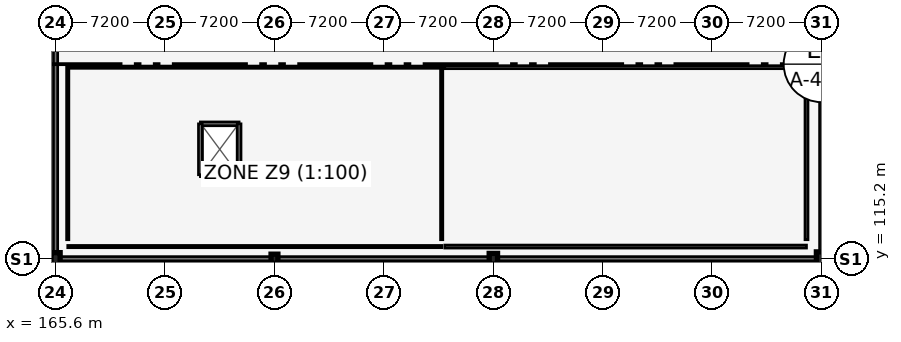
"""IFC4 building model, lengths in metres.
Left out: names, types, materials, properties, quantities, classifications, styles, units other than length and angle.
Written with IfcOpenShell. Run it as: python <this file> out.ifc"""

import sys

from ifc_helpers import new_model, si_unit, direction, frame, frame_2d, origin, origin_2d, place, context, subcontext, project, spatial, rectangle, extrude, element, fill, save


model = new_model("IFC4")
c1 = context("Model", 3, precision=1e-05, world=origin(), true_north=direction((0.0, 1.0)))
c2 = subcontext(c1, "Body", "Model", "MODEL_VIEW")
j1 = project(units=[si_unit("LENGTHUNIT", "METRE"), si_unit("PLANEANGLEUNIT", "RADIAN")], contexts=[c1])
p1 = place(None, origin())
s1 = spatial("IfcSite", under=j1, at=p1, CompositionType="ELEMENT")
p2 = place(p1, origin())
s2 = spatial("IfcBuilding", under=s1, at=p2, CompositionType="ELEMENT")
p3 = place(p2, frame((0.0, 0.0, 4.8)))
s3 = spatial("IfcBuildingStorey", under=s2, at=p3, CompositionType="ELEMENT", Elevation=4.8)
p4 = place(p3, frame((165.6, 115.2, 0.0), z_axis=(0.0, 0.0, 1.0), x_axis=(1.0, 0.0, 0.0)))
e1 = element("IfcColumn", 1, at=p4, inside=s3, PredefinedType="COLUMN", context=c2, shape_type="SweptSolid", body=[
    extrude(rectangle(XDim=0.6, YDim=0.8, at=origin_2d()), origin(), (0.0, 0.0, 1.0), 4.2),
])
p5 = place(p3, frame((180.0, 115.2, 0.0), z_axis=(0.0, 0.0, 1.0), x_axis=(1.0, 0.0, 0.0)))
e2 = element("IfcColumn", 2, at=p5, inside=s3, PredefinedType="COLUMN", context=c2, shape_type="SweptSolid", body=[
    extrude(rectangle(XDim=0.45, YDim=0.6, at=origin_2d()), origin(), (0.0, 0.0, 1.0), 4.2),
])
p6 = place(p3, frame((194.4, 115.2, 0.0), z_axis=(0.0, 0.0, 1.0), x_axis=(1.0, 0.0, 0.0)))
e3 = element("IfcColumn", 3, at=p6, inside=s3, PredefinedType="COLUMN", context=c2, shape_type="SweptSolid", body=[
    extrude(rectangle(XDim=0.55, YDim=0.7, at=origin_2d()), origin(), (0.0, 0.0, 1.0), 4.2),
])
p7 = place(p3, frame((216.0, 115.2, 0.0), z_axis=(0.0, 0.0, 1.0), x_axis=(1.0, 0.0, 0.0)))
e4 = element("IfcColumn", 4, at=p7, inside=s3, PredefinedType="COLUMN", context=c2, shape_type="SweptSolid", body=[
    extrude(rectangle(XDim=0.7, YDim=0.9, at=origin_2d()), origin(), (0.0, 0.0, 1.0), 4.2),
])
p8 = place(p3, frame((165.6, 115.2, 0.0), z_axis=(0.0, 0.0, 1.0), x_axis=(1.0, 0.0, 0.0)))
e5 = element("IfcWall", 5, at=p8, inside=s3, PredefinedType="SOLIDWALL", context=c2, shape_type="SweptSolid", body=[
    extrude(rectangle(XDim=50.4, YDim=0.28, at=frame_2d((25.2, 0.0))), origin(), (0.0, 0.0, 1.0), 3.5),
])
p9 = place(p8, frame((2.2, 0.0, 0.78)))
e6 = element("IfcOpeningElement", 6, at=p9, cuts=e5, PredefinedType="OPENING", context=c2, shape_type="SweptSolid", body=[
    extrude(rectangle(XDim=1.25, YDim=1.7, at=frame_2d((0.625, 0.85))), frame((0.0, 0.15, 0.0), z_axis=(0.0, -1.0, 0.0), x_axis=(1.0, 0.0, 0.0)), (0.0, 0.0, 1.0), 0.3),
])
p10 = place(p8, frame((9.4, 0.0, 0.78)))
e7 = element("IfcOpeningElement", 7, at=p10, cuts=e5, PredefinedType="OPENING", context=c2, shape_type="SweptSolid", body=[
    extrude(rectangle(XDim=1.35, YDim=1.75, at=frame_2d((0.675, 0.875))), frame((0.0, 0.15, 0.0), z_axis=(0.0, -1.0, 0.0), x_axis=(1.0, 0.0, 0.0)), (0.0, 0.0, 1.0), 0.3),
])
p11 = place(p8, frame((16.6, 0.0, 0.78)))
e8 = element("IfcOpeningElement", 8, at=p11, cuts=e5, PredefinedType="OPENING", context=c2, shape_type="SweptSolid", body=[
    extrude(rectangle(XDim=1.5, YDim=1.75, at=frame_2d((0.75, 0.875))), frame((0.0, 0.15, 0.0), z_axis=(0.0, -1.0, 0.0), x_axis=(1.0, 0.0, 0.0)), (0.0, 0.0, 1.0), 0.3),
])
p12 = place(p8, frame((23.8, 0.0, 0.78)))
e9 = element("IfcOpeningElement", 9, at=p12, cuts=e5, PredefinedType="OPENING", context=c2, shape_type="SweptSolid", body=[
    extrude(rectangle(XDim=1.65, YDim=1.8, at=frame_2d((0.825, 0.9))), frame((0.0, 0.15, 0.0), z_axis=(0.0, -1.0, 0.0), x_axis=(1.0, 0.0, 0.0)), (0.0, 0.0, 1.0), 0.3),
])
p13 = place(p8, frame((31.0, 0.0, 0.78)))
e10 = element("IfcOpeningElement", 10, at=p13, cuts=e5, PredefinedType="OPENING", context=c2, shape_type="SweptSolid", body=[
    extrude(rectangle(XDim=1.95, YDim=1.8, at=frame_2d((0.975, 0.9))), frame((0.0, 0.15, 0.0), z_axis=(0.0, -1.0, 0.0), x_axis=(1.0, 0.0, 0.0)), (0.0, 0.0, 1.0), 0.3),
])
p14 = place(p8, frame((38.2, 0.0, 0.78)))
e11 = element("IfcOpeningElement", 11, at=p14, cuts=e5, PredefinedType="OPENING", context=c2, shape_type="SweptSolid", body=[
    extrude(rectangle(XDim=2.1, YDim=1.8, at=frame_2d((1.05, 0.9))), frame((0.0, 0.15, 0.0), z_axis=(0.0, -1.0, 0.0), x_axis=(1.0, 0.0, 0.0)), (0.0, 0.0, 1.0), 0.3),
])
p15 = place(p3, frame((165.6, 144.0, 0.0), z_axis=(0.0, 0.0, 1.0), x_axis=(0.0, -1.0, 0.0)))
e12 = element("IfcWall", 12, at=p15, inside=s3, PredefinedType="SOLIDWALL", context=c2, shape_type="SweptSolid", body=[
    extrude(rectangle(XDim=28.8, YDim=0.28, at=frame_2d((14.4, 0.0))), origin(), (0.0, 0.0, 1.0), 3.5),
])
p16 = place(p15, frame((2.2, 0.0, 0.78)))
e13 = element("IfcOpeningElement", 13, at=p16, cuts=e12, PredefinedType="OPENING", context=c2, shape_type="SweptSolid", body=[
    extrude(rectangle(XDim=1.5, YDim=1.75, at=frame_2d((0.75, 0.875))), frame((0.0, 0.15, 0.0), z_axis=(0.0, -1.0, 0.0), x_axis=(1.0, 0.0, 0.0)), (0.0, 0.0, 1.0), 0.3),
])
p17 = place(p15, frame((9.4, 0.0, 0.78)))
e14 = element("IfcOpeningElement", 14, at=p17, cuts=e12, PredefinedType="OPENING", context=c2, shape_type="SweptSolid", body=[
    extrude(rectangle(XDim=1.65, YDim=1.8, at=frame_2d((0.825, 0.9))), frame((0.0, 0.15, 0.0), z_axis=(0.0, -1.0, 0.0), x_axis=(1.0, 0.0, 0.0)), (0.0, 0.0, 1.0), 0.3),
])
p18 = place(p15, frame((16.6, 0.0, 0.78)))
e15 = element("IfcOpeningElement", 15, at=p18, cuts=e12, PredefinedType="OPENING", context=c2, shape_type="SweptSolid", body=[
    extrude(rectangle(XDim=1.95, YDim=1.8, at=frame_2d((0.975, 0.9))), frame((0.0, 0.15, 0.0), z_axis=(0.0, -1.0, 0.0), x_axis=(1.0, 0.0, 0.0)), (0.0, 0.0, 1.0), 0.3),
])
p19 = place(p3, frame((216.0, 115.2, 0.0), z_axis=(0.0, 0.0, 1.0), x_axis=(0.0, 1.0, 0.0)))
e16 = element("IfcWall", 16, at=p19, inside=s3, PredefinedType="SOLIDWALL", context=c2, shape_type="SweptSolid", body=[
    extrude(rectangle(XDim=28.8, YDim=0.28, at=frame_2d((14.4, 0.0))), origin(), (0.0, 0.0, 1.0), 3.482),
])
p20 = place(p19, frame((2.2, 0.0, 0.78)))
e17 = element("IfcOpeningElement", 17, at=p20, cuts=e16, PredefinedType="OPENING", context=c2, shape_type="SweptSolid", body=[
    extrude(rectangle(XDim=1.65, YDim=1.8, at=frame_2d((0.825, 0.9))), frame((0.0, 0.15, 0.0), z_axis=(0.0, -1.0, 0.0), x_axis=(1.0, 0.0, 0.0)), (0.0, 0.0, 1.0), 0.3),
])
p21 = place(p19, frame((9.4, 0.0, 0.78)))
e18 = element("IfcOpeningElement", 18, at=p21, cuts=e16, PredefinedType="OPENING", context=c2, shape_type="SweptSolid", body=[
    extrude(rectangle(XDim=1.95, YDim=1.8, at=frame_2d((0.975, 0.9))), frame((0.0, 0.15, 0.0), z_axis=(0.0, -1.0, 0.0), x_axis=(1.0, 0.0, 0.0)), (0.0, 0.0, 1.0), 0.3),
])
p22 = place(p19, frame((16.6, 0.0, 0.78)))
e19 = element("IfcOpeningElement", 19, at=p22, cuts=e16, PredefinedType="OPENING", context=c2, shape_type="SweptSolid", body=[
    extrude(rectangle(XDim=2.1, YDim=1.8, at=frame_2d((1.05, 0.9))), frame((0.0, 0.15, 0.0), z_axis=(0.0, -1.0, 0.0), x_axis=(1.0, 0.0, 0.0)), (0.0, 0.0, 1.0), 0.3),
])
p23 = place(p3, frame((175.125, 120.725, 0.0), z_axis=(0.0, 0.0, 1.0), x_axis=(1.0, 0.0, 0.0)))
e20 = element("IfcWall", 20, at=p23, inside=s3, PredefinedType="SHEAR", context=c2, shape_type="SweptSolid", body=[
    extrude(rectangle(XDim=2.55, YDim=0.25, at=frame_2d((1.275, 0.0))), origin(), (0.0, 0.0, 1.0), 3.55),
])
p24 = place(p3, frame((177.675, 124.075, 0.0), z_axis=(0.0, 0.0, 1.0), x_axis=(-1.0, 0.0, 0.0)))
e21 = element("IfcWall", 21, at=p24, inside=s3, PredefinedType="SHEAR", context=c2, shape_type="SweptSolid", body=[
    extrude(rectangle(XDim=2.55, YDim=0.25, at=frame_2d((1.275, 0.0))), origin(), (0.0, 0.0, 1.0), 3.55),
])
p25 = place(p24, frame((0.525, 0.0, 0.0)))
e22 = element("IfcOpeningElement", 22, at=p25, cuts=e21, PredefinedType="OPENING", context=c2, shape_type="SweptSolid", body=[
    extrude(rectangle(XDim=1.5, YDim=2.2, at=frame_2d((0.75, 1.1))), frame((0.0, 0.135, 0.0), z_axis=(0.0, -1.0, 0.0), x_axis=(1.0, 0.0, 0.0)), (0.0, 0.0, 1.0), 0.27),
])
for number, where, z_axis, x_axis in (
    (23, (175.125, 124.075, 0.0), (0.0, 0.0, 1.0), (0.0, -1.0, 0.0)),
    (24, (177.675, 120.725, 0.0), (0.0, 0.0, 1.0), (0.0, 1.0, 0.0)),
):
    element("IfcWall", number, at=place(p3, frame(where, z_axis=z_axis, x_axis=x_axis)), inside=s3, PredefinedType="SHEAR", context=c2, shape_type="SweptSolid", body=[
        extrude(rectangle(XDim=3.35, YDim=0.25, at=frame_2d((1.675, 0.0))), origin(), (0.0, 0.0, 1.0), 3.55),
    ])
p26 = place(p3, frame((191.0, 116.0, 0.0), z_axis=(0.0, 0.0, 1.0), x_axis=(-1.0, 0.0, 0.0)))
e25 = element("IfcWall", 25, at=p26, inside=s3, PredefinedType="PARTITIONING", context=c2, shape_type="SweptSolid", body=[
    extrude(rectangle(XDim=24.6, YDim=0.15, at=frame_2d((12.3, 0.0))), origin(), (0.0, 0.0, 1.0), 3.253),
])
for number, where, z_axis, x_axis in (
    (26, (191.0, 116.45, 0.0), (0.0, 0.0, 1.0), (0.0, 1.0, 0.0)),
    (27, (166.4, 127.8, 0.0), (0.0, 0.0, 1.0), (0.0, -1.0, 0.0)),
):
    element("IfcWall", number, at=place(p3, frame(where, z_axis=z_axis, x_axis=x_axis)), inside=s3, PredefinedType="PARTITIONING", context=c2, shape_type="SweptSolid", body=[
        extrude(rectangle(XDim=11.35, YDim=0.15, at=frame_2d((5.675, 0.0))), origin(), (0.0, 0.0, 1.0), 3.6),
    ])
p27 = place(p3, frame((166.4, 127.8, 0.0), z_axis=(0.0, 0.0, 1.0), x_axis=(1.0, 0.0, 0.0)))
e28 = element("IfcWall", 28, at=p27, inside=s3, PredefinedType="PARTITIONING", context=c2, shape_type="SweptSolid", body=[
    extrude(rectangle(XDim=24.6, YDim=0.15, at=frame_2d((12.3, 0.0))), origin(), (0.0, 0.0, 1.0), 3.253),
])
p28 = place(p27, frame((11.82, 0.0, 0.0)))
e29 = element("IfcOpeningElement", 29, at=p28, cuts=e28, PredefinedType="OPENING", context=c2, shape_type="SweptSolid", body=[
    extrude(rectangle(XDim=0.96, YDim=2.15, at=frame_2d((0.48, 1.075))), frame((0.0, 0.085, 0.0), z_axis=(0.0, -1.0, 0.0), x_axis=(1.0, 0.0, 0.0)), (0.0, 0.0, 1.0), 0.17),
])
p29 = place(p3, frame((215.0, 116.0, 0.0), z_axis=(0.0, 0.0, 1.0), x_axis=(-1.0, 0.0, 0.0)))
e30 = element("IfcWall", 30, at=p29, inside=s3, PredefinedType="SOLIDWALL", context=c2, shape_type="SweptSolid", body=[
    extrude(rectangle(XDim=23.8, YDim=0.2, at=frame_2d((11.9, 0.0))), origin(), (0.0, 0.0, 1.0), 3.174),
])
p30 = place(p3, frame((215.0, 116.45, 0.0), z_axis=(0.0, 0.0, 1.0), x_axis=(0.0, 1.0, 0.0)))
e31 = element("IfcWall", 31, at=p30, inside=s3, PredefinedType="SOLIDWALL", context=c2, shape_type="SweptSolid", body=[
    extrude(rectangle(XDim=11.35, YDim=0.2, at=frame_2d((5.675, 0.0))), origin(), (0.0, 0.0, 1.0), 3.6),
])
p31 = place(p3, frame((191.2, 127.8, 0.0), z_axis=(0.0, 0.0, 1.0), x_axis=(1.0, 0.0, 0.0)))
e32 = element("IfcWall", 32, at=p31, inside=s3, PredefinedType="SOLIDWALL", context=c2, shape_type="SweptSolid", body=[
    extrude(rectangle(XDim=23.8, YDim=0.2, at=frame_2d((11.9, 0.0))), origin(), (0.0, 0.0, 1.0), 3.174),
])
p32 = place(p31, frame((11.0, 0.0, 0.0)))
e33 = element("IfcOpeningElement", 33, at=p32, cuts=e32, PredefinedType="OPENING", context=c2, shape_type="SweptSolid", body=[
    extrude(rectangle(XDim=1.8, YDim=2.2, at=frame_2d((0.9, 1.1))), frame((0.0, 0.11, 0.0), z_axis=(0.0, -1.0, 0.0), x_axis=(1.0, 0.0, 0.0)), (0.0, 0.0, 1.0), 0.22),
])
p33 = place(p9, origin())
e34 = element("IfcWindow", 34, at=p33, inside=s3, PartitioningType="SINGLE_PANEL", PredefinedType="WINDOW", context=c2, shape_type="SweptSolid", body=[
    extrude(rectangle(XDim=1.25, YDim=1.7, at=frame_2d((0.625, 0.85))), frame((0.0, 0.03, 0.0), z_axis=(0.0, -1.0, 0.0), x_axis=(1.0, 0.0, 0.0)), (0.0, 0.0, 1.0), 0.06),
])
fill(e6, e34)
p34 = place(p10, origin())
e35 = element("IfcWindow", 35, at=p34, inside=s3, PartitioningType="SINGLE_PANEL", PredefinedType="WINDOW", context=c2, shape_type="SweptSolid", body=[
    extrude(rectangle(XDim=1.35, YDim=1.75, at=frame_2d((0.675, 0.875))), frame((0.0, 0.03, 0.0), z_axis=(0.0, -1.0, 0.0), x_axis=(1.0, 0.0, 0.0)), (0.0, 0.0, 1.0), 0.06),
])
fill(e7, e35)
p35 = place(p11, origin())
e36 = element("IfcWindow", 36, at=p35, inside=s3, PartitioningType="SINGLE_PANEL", PredefinedType="WINDOW", context=c2, shape_type="SweptSolid", body=[
    extrude(rectangle(XDim=1.5, YDim=1.75, at=frame_2d((0.75, 0.875))), frame((0.0, 0.03, 0.0), z_axis=(0.0, -1.0, 0.0), x_axis=(1.0, 0.0, 0.0)), (0.0, 0.0, 1.0), 0.06),
])
fill(e8, e36)
p36 = place(p12, origin())
e37 = element("IfcWindow", 37, at=p36, inside=s3, PartitioningType="SINGLE_PANEL", PredefinedType="WINDOW", context=c2, shape_type="SweptSolid", body=[
    extrude(rectangle(XDim=1.65, YDim=1.8, at=frame_2d((0.825, 0.9))), frame((0.0, 0.03, 0.0), z_axis=(0.0, -1.0, 0.0), x_axis=(1.0, 0.0, 0.0)), (0.0, 0.0, 1.0), 0.06),
])
fill(e9, e37)
p37 = place(p13, origin())
e38 = element("IfcWindow", 38, at=p37, inside=s3, PartitioningType="SINGLE_PANEL", PredefinedType="WINDOW", context=c2, shape_type="SweptSolid", body=[
    extrude(rectangle(XDim=1.95, YDim=1.8, at=frame_2d((0.975, 0.9))), frame((0.0, 0.03, 0.0), z_axis=(0.0, -1.0, 0.0), x_axis=(1.0, 0.0, 0.0)), (0.0, 0.0, 1.0), 0.06),
])
fill(e10, e38)
p38 = place(p14, origin())
e39 = element("IfcWindow", 39, at=p38, inside=s3, PartitioningType="SINGLE_PANEL", PredefinedType="WINDOW", context=c2, shape_type="SweptSolid", body=[
    extrude(rectangle(XDim=2.1, YDim=1.8, at=frame_2d((1.05, 0.9))), frame((0.0, 0.03, 0.0), z_axis=(0.0, -1.0, 0.0), x_axis=(1.0, 0.0, 0.0)), (0.0, 0.0, 1.0), 0.06),
])
fill(e11, e39)
p39 = place(p18, origin())
e40 = element("IfcWindow", 40, at=p39, inside=s3, PartitioningType="SINGLE_PANEL", PredefinedType="WINDOW", context=c2, shape_type="SweptSolid", body=[
    extrude(rectangle(XDim=1.95, YDim=1.8, at=frame_2d((0.975, 0.9))), frame((0.0, 0.03, 0.0), z_axis=(0.0, -1.0, 0.0), x_axis=(1.0, 0.0, 0.0)), (0.0, 0.0, 1.0), 0.06),
])
fill(e15, e40)
p40 = place(p20, origin())
e41 = element("IfcWindow", 41, at=p40, inside=s3, PartitioningType="SINGLE_PANEL", PredefinedType="WINDOW", context=c2, shape_type="SweptSolid", body=[
    extrude(rectangle(XDim=1.65, YDim=1.8, at=frame_2d((0.825, 0.9))), frame((0.0, 0.03, 0.0), z_axis=(0.0, -1.0, 0.0), x_axis=(1.0, 0.0, 0.0)), (0.0, 0.0, 1.0), 0.06),
])
fill(e17, e41)
p41 = place(p21, origin())
e42 = element("IfcWindow", 42, at=p41, inside=s3, PartitioningType="SINGLE_PANEL", PredefinedType="WINDOW", context=c2, shape_type="SweptSolid", body=[
    extrude(rectangle(XDim=1.95, YDim=1.8, at=frame_2d((0.975, 0.9))), frame((0.0, 0.03, 0.0), z_axis=(0.0, -1.0, 0.0), x_axis=(1.0, 0.0, 0.0)), (0.0, 0.0, 1.0), 0.06),
])
fill(e18, e42)
p42 = place(p25, origin())
e43 = element("IfcDoor", 43, at=p42, inside=s3, OperationType="SLIDING_TO_RIGHT", PredefinedType="DOOR", context=c2, shape_type="SweptSolid", body=[
    extrude(rectangle(XDim=1.5, YDim=2.2, at=frame_2d((0.75, 1.1))), frame((0.0, 0.025, 0.0), z_axis=(0.0, -1.0, 0.0), x_axis=(1.0, 0.0, 0.0)), (0.0, 0.0, 1.0), 0.05),
])
fill(e22, e43)
p43 = place(p28, origin())
e44 = element("IfcDoor", 44, at=p43, inside=s3, OperationType="SINGLE_SWING_LEFT", PredefinedType="DOOR", context=c2, shape_type="SweptSolid", body=[
    extrude(rectangle(XDim=0.96, YDim=2.15, at=frame_2d((0.48, 1.075))), frame((0.0, 0.025, 0.0), z_axis=(0.0, -1.0, 0.0), x_axis=(1.0, 0.0, 0.0)), (0.0, 0.0, 1.0), 0.05),
])
fill(e29, e44)
p44 = place(p32, origin())
e45 = element("IfcDoor", 45, at=p44, inside=s3, OperationType="DOUBLE_SWING_LEFT", PredefinedType="DOOR", context=c2, shape_type="SweptSolid", body=[
    extrude(rectangle(XDim=1.8, YDim=2.2, at=frame_2d((0.9, 1.1))), frame((0.0, 0.025, 0.0), z_axis=(0.0, -1.0, 0.0), x_axis=(1.0, 0.0, 0.0)), (0.0, 0.0, 1.0), 0.05),
])
fill(e33, e45)
save(model, sys.argv[1])
